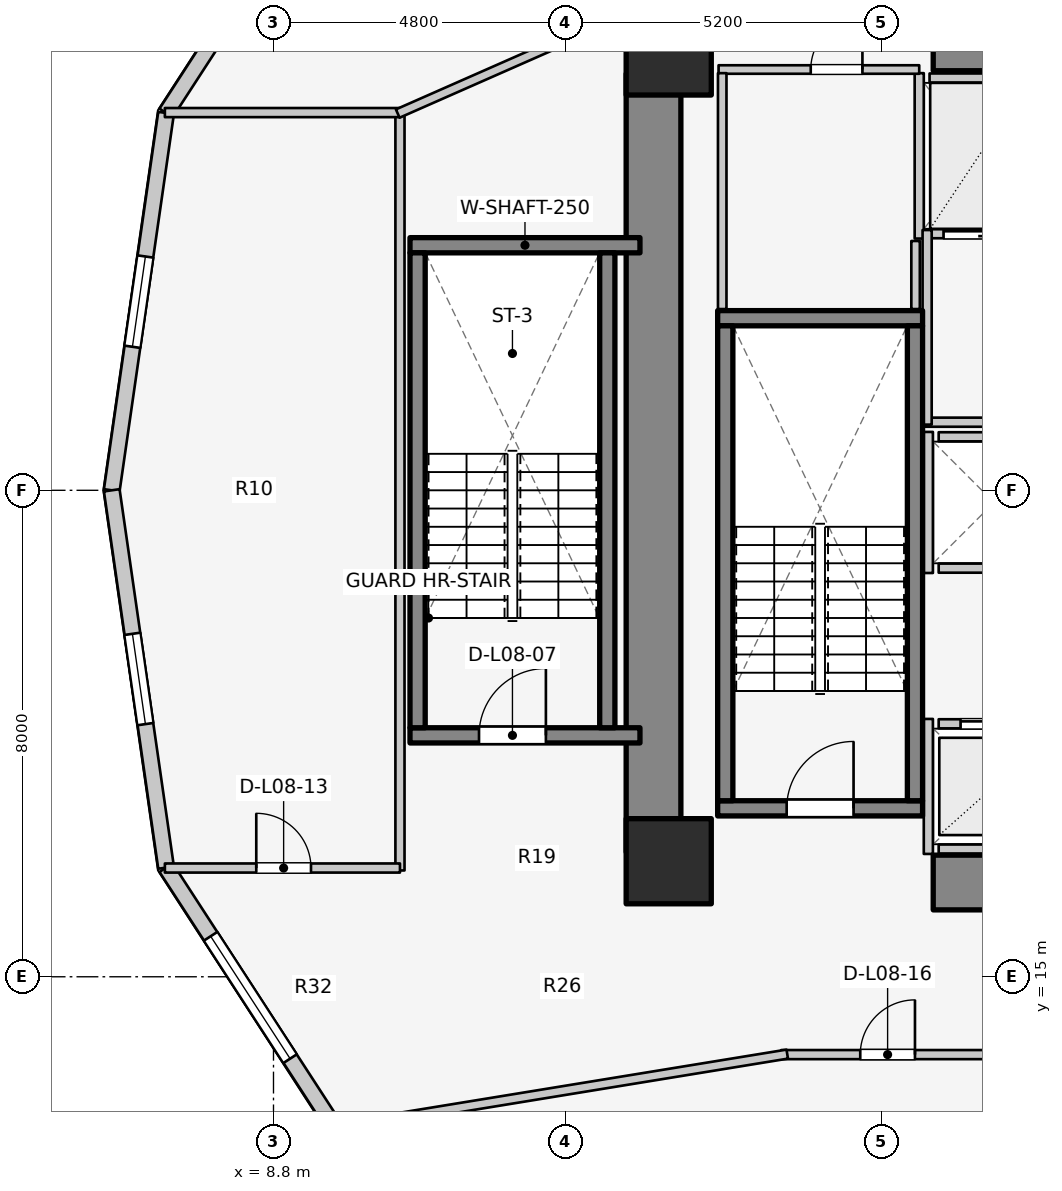
"""IFC4 building model, lengths in metres.
Left out: names, types, materials, properties, quantities, classifications, styles, units other than length and angle.
Written with IfcOpenShell. Run it as: python <this file> out.ifc"""

import sys

from ifc_helpers import new_model, si_unit, direction, frame, frame_2d, origin, origin_2d, place, context, subcontext, project, spatial, rectangle, extrude, element, fill, save


model = new_model("IFC4")
c1 = context("Model", 3, precision=1e-05, world=origin(), true_north=direction((0.0, 1.0)))
c2 = subcontext(c1, "Body", "Model", "MODEL_VIEW")
j1 = project(units=[si_unit("LENGTHUNIT", "METRE"), si_unit("PLANEANGLEUNIT", "RADIAN")], contexts=[c1])
p1 = place(None, origin())
s1 = spatial("IfcSite", under=j1, at=p1, CompositionType="ELEMENT")
p2 = place(p1, origin())
s2 = spatial("IfcBuilding", under=s1, at=p2, CompositionType="ELEMENT")
p3 = place(p2, frame((0.0, 0.0, 30.7)))
s3 = spatial("IfcBuildingStorey", under=s2, at=p3, CompositionType="ELEMENT", Elevation=30.7)
p4 = place(p3, frame((15.05, 17.05, 0.0), z_axis=(0.0, 0.0, 1.0), x_axis=(0.0, 1.0, 0.0)))
e1 = element("IfcWall", 1, at=p4, inside=s3, PredefinedType="SHEAR", context=c2, shape_type="SweptSolid", body=[
    extrude(rectangle(XDim=12.8, YDim=0.9, at=frame_2d((6.4, 0.0))), origin(), (0.0, 0.0, 1.0), 3.1),
])
for number, where, z_axis, x_axis in (
    (2, (19.65, 16.55, 0.0), (0.0, 0.0, 1.0), (1.0, 0.0, 0.0)),
    (3, (19.65, 30.35, 0.0), (0.0, 0.0, 1.0), (1.0, 0.0, 0.0)),
):
    element("IfcWall", number, at=place(p3, frame(where, z_axis=z_axis, x_axis=x_axis)), inside=s3, PredefinedType="SHEAR", context=c2, shape_type="SweptSolid", body=[
        extrude(rectangle(XDim=4.5, YDim=0.9, at=frame_2d((2.25, 0.0))), origin(), (0.0, 0.0, 1.0), 3.1),
    ])
p5 = place(p3, frame((16.105, 17.77, 0.0), z_axis=(0.0, 0.0, 1.0), x_axis=(1.0, 0.0, 0.0)))
e4 = element("IfcWall", 4, at=p5, inside=s3, PredefinedType="SOLIDWALL", context=c2, shape_type="SweptSolid", body=[
    extrude(rectangle(XDim=3.37, YDim=0.25, at=frame_2d((1.685, 0.0))), origin(), (0.0, 0.0, 1.0), 3.1),
])
p6 = place(p5, frame((1.135, 0.0, 0.0)))
e5 = element("IfcOpeningElement", 5, at=p6, cuts=e4, PredefinedType="OPENING", context=c2, shape_type="SweptSolid", body=[
    extrude(rectangle(XDim=1.1, YDim=2.1, at=frame_2d((0.55, 1.05))), frame((0.0, 0.135, 0.0), z_axis=(0.0, -1.0, 0.0), x_axis=(1.0, 0.0, 0.0)), (0.0, 0.0, 1.0), 0.27),
])
p7 = place(p3, frame((16.105, 25.83, 0.0), z_axis=(0.0, 0.0, 1.0), x_axis=(1.0, 0.0, 0.0)))
e6 = element("IfcWall", 6, at=p7, inside=s3, PredefinedType="SOLIDWALL", context=c2, shape_type="SweptSolid", body=[
    extrude(rectangle(XDim=3.37, YDim=0.25, at=frame_2d((1.685, 0.0))), origin(), (0.0, 0.0, 1.0), 3.1),
])
for number, where, z_axis, x_axis in (
    (7, (16.23, 17.895, 0.0), (0.0, 0.0, 1.0), (0.0, 1.0, 0.0)),
    (8, (19.35, 17.895, 0.0), (0.0, 0.0, 1.0), (0.0, 1.0, 0.0)),
):
    element("IfcWall", number, at=place(p3, frame(where, z_axis=z_axis, x_axis=x_axis)), inside=s3, PredefinedType="SOLIDWALL", context=c2, shape_type="SweptSolid", body=[
        extrude(rectangle(XDim=7.81, YDim=0.25, at=frame_2d((3.905, 0.0))), origin(), (0.0, 0.0, 1.0), 3.1),
    ])
p8 = place(p3, frame((11.045, 18.97, 0.0), z_axis=(0.0, 0.0, 1.0), x_axis=(1.0, 0.0, 0.0)))
e9 = element("IfcWall", 9, at=p8, inside=s3, PredefinedType="SOLIDWALL", context=c2, shape_type="SweptSolid", body=[
    extrude(rectangle(XDim=3.782, YDim=0.25, at=frame_2d((1.891, 0.0))), origin(), (0.0, 0.0, 1.0), 3.1),
])
p9 = place(p8, frame((1.135, 0.0, 0.0)))
e10 = element("IfcOpeningElement", 10, at=p9, cuts=e9, PredefinedType="OPENING", context=c2, shape_type="SweptSolid", body=[
    extrude(rectangle(XDim=1.1, YDim=2.1, at=frame_2d((0.55, 1.05))), frame((0.0, 0.135, 0.0), z_axis=(0.0, -1.0, 0.0), x_axis=(1.0, 0.0, 0.0)), (0.0, 0.0, 1.0), 0.27),
])
p10 = place(p3, frame((11.045, 27.03, 0.0), z_axis=(0.0, 0.0, 1.0), x_axis=(1.0, 0.0, 0.0)))
e11 = element("IfcWall", 11, at=p10, inside=s3, PredefinedType="SOLIDWALL", context=c2, shape_type="SweptSolid", body=[
    extrude(rectangle(XDim=3.782, YDim=0.25, at=frame_2d((1.891, 0.0))), origin(), (0.0, 0.0, 1.0), 3.1),
])
for number, where, z_axis, x_axis in (
    (12, (11.17, 19.095, 0.0), (0.0, 0.0, 1.0), (0.0, 1.0, 0.0)),
    (13, (14.29, 19.095, 0.0), (0.0, 0.0, 1.0), (0.0, 1.0, 0.0)),
):
    element("IfcWall", number, at=place(p3, frame(where, z_axis=z_axis, x_axis=x_axis)), inside=s3, PredefinedType="SOLIDWALL", context=c2, shape_type="SweptSolid", body=[
        extrude(rectangle(XDim=7.81, YDim=0.25, at=frame_2d((3.905, 0.0))), origin(), (0.0, 0.0, 1.0), 3.1),
    ])
for number, where, z_axis, x_axis in (
    (14, (15.3, 16.9, 0.0), (0.0, 0.0, 1.0), (1.0, 0.0, 0.0)),
    (15, (15.3, 30.2, 0.0), (0.0, 0.0, 1.0), (1.0, 0.0, 0.0)),
):
    element("IfcColumn", number, at=place(p3, frame(where, z_axis=z_axis, x_axis=x_axis)), inside=s3, PredefinedType="COLUMN", context=c2, shape_type="SweptSolid", body=[
        extrude(rectangle(XDim=1.4, YDim=1.4, at=origin_2d()), origin(), (0.0, 0.0, 1.0), 3.1),
    ])
p11 = place(p3, frame((9.806, 33.476, 0.0), z_axis=(0.0, 0.0, 1.0), x_axis=(-0.544578722263, -0.838709732421, 0.0)))
e16 = element("IfcWall", 16, at=p11, inside=s3, PredefinedType="STANDARD", context=c2, shape_type="SweptSolid", body=[
    extrude(rectangle(XDim=5.092, YDim=0.26, at=frame_2d((2.546, 0.0))), origin(), (0.0, 0.0, 1.0), 2.85),
])
p12 = place(p11, frame((1.346, 0.0, 0.75)))
e17 = element("IfcOpeningElement", 17, at=p12, cuts=e16, PredefinedType="OPENING", context=c2, shape_type="SweptSolid", body=[
    extrude(rectangle(XDim=2.4, YDim=1.7, at=frame_2d((1.2, 0.85))), frame((0.0, 0.14, 0.0), z_axis=(0.0, -1.0, 0.0), x_axis=(1.0, 0.0, 0.0)), (0.0, 0.0, 1.0), 0.28),
])
p13 = place(p3, frame((7.033, 29.205, 0.0), z_axis=(0.0, 0.0, 1.0), x_axis=(-0.142528001686, -0.989790770181, 0.0)))
e18 = element("IfcWall", 18, at=p13, inside=s3, PredefinedType="STANDARD", context=c2, shape_type="SweptSolid", body=[
    extrude(rectangle(XDim=6.269, YDim=0.26, at=frame_2d((3.135, 0.0))), origin(), (0.0, 0.0, 1.0), 2.85),
])
p14 = place(p13, frame((2.385, 0.0, 0.75)))
e19 = element("IfcOpeningElement", 19, at=p14, cuts=e18, PredefinedType="OPENING", context=c2, shape_type="SweptSolid", body=[
    extrude(rectangle(XDim=1.5, YDim=1.6, at=frame_2d((0.75, 0.8))), frame((0.0, 0.14, 0.0), z_axis=(0.0, -1.0, 0.0), x_axis=(1.0, 0.0, 0.0)), (0.0, 0.0, 1.0), 0.28),
])
p15 = place(p3, frame((6.14, 23.0, 0.0), z_axis=(0.0, 0.0, 1.0), x_axis=(0.142528001686, -0.989790770181, 0.0)))
e20 = element("IfcWall", 20, at=p15, inside=s3, PredefinedType="STANDARD", context=c2, shape_type="SweptSolid", body=[
    extrude(rectangle(XDim=6.269, YDim=0.26, at=frame_2d((3.135, 0.0))), origin(), (0.0, 0.0, 1.0), 2.85),
])
p16 = place(p15, frame((2.385, 0.0, 0.75)))
e21 = element("IfcOpeningElement", 21, at=p16, cuts=e20, PredefinedType="OPENING", context=c2, shape_type="SweptSolid", body=[
    extrude(rectangle(XDim=1.5, YDim=1.6, at=frame_2d((0.75, 0.8))), frame((0.0, 0.14, 0.0), z_axis=(0.0, -1.0, 0.0), x_axis=(1.0, 0.0, 0.0)), (0.0, 0.0, 1.0), 0.28),
])
p17 = place(p3, frame((7.033, 16.795, 0.0), z_axis=(0.0, 0.0, 1.0), x_axis=(0.544578722263, -0.838709732421, 0.0)))
e22 = element("IfcWall", 22, at=p17, inside=s3, PredefinedType="STANDARD", context=c2, shape_type="SweptSolid", body=[
    extrude(rectangle(XDim=5.092, YDim=0.26, at=frame_2d((2.546, 0.0))), origin(), (0.0, 0.0, 1.0), 2.85),
])
p18 = place(p17, frame((1.346, 0.0, 0.75)))
e23 = element("IfcOpeningElement", 23, at=p18, cuts=e22, PredefinedType="OPENING", context=c2, shape_type="SweptSolid", body=[
    extrude(rectangle(XDim=2.4, YDim=1.7, at=frame_2d((1.2, 0.85))), frame((0.0, 0.14, 0.0), z_axis=(0.0, -1.0, 0.0), x_axis=(1.0, 0.0, 0.0)), (0.0, 0.0, 1.0), 0.28),
])
p19 = place(p3, frame((19.74, 19.16, 0.0), z_axis=(0.0, 0.0, 1.0), x_axis=(1.0, 0.0, 0.0)))
e24 = element("IfcWall", 24, at=p19, inside=s3, PredefinedType="SOLIDWALL", context=c2, shape_type="SweptSolid", body=[
    extrude(rectangle(XDim=1.82, YDim=0.15, at=frame_2d((0.91, 0.0))), origin(), (0.0, 0.0, 1.0), 2.855),
])
p20 = place(p19, frame((0.36, 0.0, 0.0)))
e25 = element("IfcOpeningElement", 25, at=p20, cuts=e24, PredefinedType="OPENING", context=c2, shape_type="SweptSolid", body=[
    extrude(rectangle(XDim=1.1, YDim=2.1, at=frame_2d((0.55, 1.05))), frame((0.0, 0.085, 0.0), z_axis=(0.0, -1.0, 0.0), x_axis=(1.0, 0.0, 0.0)), (0.0, 0.0, 1.0), 0.17),
])
p21 = place(p3, frame((19.74, 17.1, 0.0), z_axis=(0.0, 0.0, 1.0), x_axis=(1.0, 0.0, 0.0)))
e26 = element("IfcWall", 26, at=p21, inside=s3, PredefinedType="SOLIDWALL", context=c2, shape_type="SweptSolid", body=[
    extrude(rectangle(XDim=1.82, YDim=0.15, at=frame_2d((0.91, 0.0))), origin(), (0.0, 0.0, 1.0), 2.855),
])
p22 = place(p3, frame((19.57, 17.02, 0.0), z_axis=(0.0, 0.0, 1.0), x_axis=(0.0, 1.0, 0.0)))
e27 = element("IfcWall", 27, at=p22, inside=s3, PredefinedType="SOLIDWALL", context=c2, shape_type="SweptSolid", body=[
    extrude(rectangle(XDim=2.22, YDim=0.15, at=frame_2d((1.11, 0.0))), origin(), (0.0, 0.0, 1.0), 2.12),
])
for number, where, z_axis, x_axis in (
    (28, (19.74, 21.72, 0.0), (0.0, 0.0, 1.0), (1.0, 0.0, 0.0)),
    (29, (19.74, 23.88, 0.0), (0.0, 0.0, 1.0), (1.0, 0.0, 0.0)),
):
    element("IfcWall", number, at=place(p3, frame(where, z_axis=z_axis, x_axis=x_axis)), inside=s3, PredefinedType="SOLIDWALL", context=c2, shape_type="SweptSolid", body=[
        extrude(rectangle(XDim=1.82, YDim=0.15, at=frame_2d((0.91, 0.0))), origin(), (0.0, 0.0, 1.0), 2.855),
    ])
p23 = place(p3, frame((19.57, 21.64, 0.0), z_axis=(0.0, 0.0, 1.0), x_axis=(0.0, 1.0, 0.0)))
e30 = element("IfcWall", 30, at=p23, inside=s3, PredefinedType="SOLIDWALL", context=c2, shape_type="SweptSolid", body=[
    extrude(rectangle(XDim=2.32, YDim=0.15, at=frame_2d((1.16, 0.0))), origin(), (0.0, 0.0, 1.0), 2.855),
])
p24 = place(p3, frame((19.59, 27.22, 0.0), z_axis=(0.0, 0.0, 1.0), x_axis=(1.0, 0.0, 0.0)))
e31 = element("IfcWall", 31, at=p24, inside=s3, PredefinedType="SOLIDWALL", context=c2, shape_type="SweptSolid", body=[
    extrude(rectangle(XDim=1.76, YDim=0.15, at=frame_2d((0.88, 0.0))), origin(), (0.0, 0.0, 1.0), 2.855),
])
p25 = place(p24, frame((0.23, 0.0, 0.0)))
e32 = element("IfcOpeningElement", 32, at=p25, cuts=e31, PredefinedType="OPENING", context=c2, shape_type="SweptSolid", body=[
    extrude(rectangle(XDim=1.3, YDim=2.1, at=frame_2d((0.65, 1.05))), frame((0.0, 0.085, 0.0), z_axis=(0.0, -1.0, 0.0), x_axis=(1.0, 0.0, 0.0)), (0.0, 0.0, 1.0), 0.17),
])
p26 = place(p3, frame((19.59, 29.78, 0.0), z_axis=(0.0, 0.0, 1.0), x_axis=(1.0, 0.0, 0.0)))
e33 = element("IfcWall", 33, at=p26, inside=s3, PredefinedType="SOLIDWALL", context=c2, shape_type="SweptSolid", body=[
    extrude(rectangle(XDim=1.76, YDim=0.15, at=frame_2d((0.88, 0.0))), origin(), (0.0, 0.0, 1.0), 2.855),
])
p27 = place(p3, frame((19.42, 27.14, 0.0), z_axis=(0.0, 0.0, 1.0), x_axis=(0.0, 1.0, 0.0)))
e34 = element("IfcWall", 34, at=p27, inside=s3, PredefinedType="SOLIDWALL", context=c2, shape_type="SweptSolid", body=[
    extrude(rectangle(XDim=2.72, YDim=0.15, at=frame_2d((1.36, 0.0))), origin(), (0.0, 0.0, 1.0), 2.855),
])
p28 = place(p3, frame((19.52, 24.12, 0.0), z_axis=(0.0, 0.0, 1.0), x_axis=(1.0, 0.0, 0.0)))
e35 = element("IfcWall", 35, at=p28, inside=s3, PredefinedType="PARTITIONING", context=c2, shape_type="SweptSolid", body=[
    extrude(rectangle(XDim=5.08, YDim=0.15, at=frame_2d((2.54, 0.0))), origin(), (0.0, 0.0, 1.0), 2.12),
])
p29 = place(p3, frame((19.55, 24.08, 0.0), z_axis=(0.0, 0.0, 1.0), x_axis=(0.0, 1.0, 0.0)))
e36 = element("IfcWall", 36, at=p29, inside=s3, PredefinedType="PARTITIONING", context=c2, shape_type="SweptSolid", body=[
    extrude(rectangle(XDim=3.2, YDim=0.15, at=frame_2d((1.6, 0.0))), origin(), (0.0, 0.0, 1.0), 2.855),
])
p30 = place(p3, frame((16.12, 29.92, 0.0), z_axis=(0.0, 0.0, 1.0), x_axis=(1.0, 0.0, 0.0)))
e37 = element("IfcWall", 37, at=p30, inside=s3, PredefinedType="PLUMBINGWALL", context=c2, shape_type="SweptSolid", body=[
    extrude(rectangle(XDim=3.3, YDim=0.14, at=frame_2d((1.65, 0.0))), origin(), (0.0, 0.0, 1.0), 2.855),
])
p31 = place(p30, frame((1.516, 0.0, 0.0)))
e38 = element("IfcOpeningElement", 38, at=p31, cuts=e37, PredefinedType="OPENING", context=c2, shape_type="SweptSolid", body=[
    extrude(rectangle(XDim=0.85, YDim=2.05, at=frame_2d((0.425, 1.025))), frame((0.0, 0.08, 0.0), z_axis=(0.0, -1.0, 0.0), x_axis=(1.0, 0.0, 0.0)), (0.0, 0.0, 1.0), 0.16),
])
p32 = place(p3, frame((16.18, 25.98, 0.0), z_axis=(0.0, 0.0, 1.0), x_axis=(0.0, 1.0, 0.0)))
e39 = element("IfcWall", 39, at=p32, inside=s3, PredefinedType="PLUMBINGWALL", context=c2, shape_type="SweptSolid", body=[
    extrude(rectangle(XDim=3.88, YDim=0.14, at=frame_2d((1.94, 0.0))), origin(), (0.0, 0.0, 1.0), 2.855),
])
p33 = place(p3, frame((19.36, 25.98, 0.0), z_axis=(0.0, 0.0, 1.0), x_axis=(0.0, 1.0, 0.0)))
e40 = element("IfcWall", 40, at=p33, inside=s3, PredefinedType="PLUMBINGWALL", context=c2, shape_type="SweptSolid", body=[
    extrude(rectangle(XDim=1.12, YDim=0.14, at=frame_2d((0.56, 0.0))), origin(), (0.0, 0.0, 1.0), 2.855),
])
p34 = place(p3, frame((10.88, 16.748, 0.0), z_axis=(0.0, 0.0, 1.0), x_axis=(0.0, 1.0, 0.0)))
e41 = element("IfcWall", 41, at=p34, inside=s3, PredefinedType="PARTITIONING", context=c2, shape_type="SweptSolid", body=[
    extrude(rectangle(XDim=12.503, YDim=0.15, at=frame_2d((6.252, 0.0))), origin(), (0.0, 0.0, 1.0), 2.12),
])
p35 = place(p3, frame((7.014, 16.788, 0.0), z_axis=(0.0, 0.0, 1.0), x_axis=(1.0, 0.0, 0.0)))
e42 = element("IfcWall", 42, at=p35, inside=s3, PredefinedType="PARTITIONING", context=c2, shape_type="SweptSolid", body=[
    extrude(rectangle(XDim=3.866, YDim=0.15, at=frame_2d((1.933, 0.0))), origin(), (0.0, 0.0, 1.0), 2.855),
])
p36 = place(p35, frame((1.503, 0.0, 0.0)))
e43 = element("IfcOpeningElement", 43, at=p36, cuts=e42, PredefinedType="OPENING", context=c2, shape_type="SweptSolid", body=[
    extrude(rectangle(XDim=0.9, YDim=2.1, at=frame_2d((0.45, 1.05))), frame((0.0, 0.085, 0.0), z_axis=(0.0, -1.0, 0.0), x_axis=(1.0, 0.0, 0.0)), (0.0, 0.0, 1.0), 0.17),
])
p37 = place(p3, frame((7.014, 29.212, 0.0), z_axis=(0.0, 0.0, 1.0), x_axis=(1.0, 0.0, 0.0)))
e44 = element("IfcWall", 44, at=p37, inside=s3, PredefinedType="PARTITIONING", context=c2, shape_type="SweptSolid", body=[
    extrude(rectangle(XDim=3.866, YDim=0.15, at=frame_2d((1.933, 0.0))), origin(), (0.0, 0.0, 1.0), 2.855),
])
p38 = place(p3, frame((10.844, 29.196, 0.0), z_axis=(0.0, 0.0, 1.0), x_axis=(0.91502756289, 0.403391322604, 0.0)))
e45 = element("IfcWall", 45, at=p38, inside=s3, PredefinedType="PARTITIONING", context=c2, shape_type="SweptSolid", body=[
    extrude(rectangle(XDim=4.637, YDim=0.15, at=frame_2d((2.319, 0.0))), origin(), (0.0, 0.0, 1.0), 2.069),
])
p39 = place(p3, frame((17.15, 13.72, 0.0), z_axis=(0.0, 0.0, 1.0), x_axis=(1.0, 0.0, 0.0)))
e46 = element("IfcWall", 46, at=p39, inside=s3, PredefinedType="PARTITIONING", context=c2, shape_type="SweptSolid", body=[
    extrude(rectangle(XDim=7.52, YDim=0.15, at=frame_2d((3.76, 0.0))), origin(), (0.0, 0.0, 1.0), 2.237),
])
p40 = place(p39, frame((1.3, 0.0, 0.0)))
e47 = element("IfcOpeningElement", 47, at=p40, cuts=e46, PredefinedType="OPENING", context=c2, shape_type="SweptSolid", body=[
    extrude(rectangle(XDim=0.9, YDim=2.1, at=frame_2d((0.45, 1.05))), frame((0.0, 0.085, 0.0), z_axis=(0.0, -1.0, 0.0), x_axis=(1.0, 0.0, 0.0)), (0.0, 0.0, 1.0), 0.17),
])
p41 = place(p3, frame((17.249, 13.728, 0.0), z_axis=(0.0, 0.0, 1.0), x_axis=(-0.98693078372, -0.161144742846, 0.0)))
e48 = element("IfcWall", 48, at=p41, inside=s3, PredefinedType="PARTITIONING", context=c2, shape_type="SweptSolid", body=[
    extrude(rectangle(XDim=7.557, YDim=0.15, at=frame_2d((3.779, 0.0))), origin(), (0.0, 0.0, 1.0), 2.069),
])
p42 = place(p3, frame((27.032, 13.569, 0.0), z_axis=(0.0, 0.0, 1.0), x_axis=(-0.781055486744, -0.624461629428, 0.0)))
e49 = element("IfcWall", 49, at=p42, inside=s3, PredefinedType="PARTITIONING", context=c2, shape_type="SweptSolid", body=[
    extrude(rectangle(XDim=10.843, YDim=0.18, at=frame_2d((5.422, 0.0))), origin(), (0.0, 0.0, 1.0), 2.237),
])
p43 = place(p14, origin())
e50 = element("IfcWindow", 50, at=p43, inside=s3, PartitioningType="SINGLE_PANEL", PredefinedType="WINDOW", context=c2, shape_type="SweptSolid", body=[
    extrude(rectangle(XDim=1.5, YDim=1.6, at=frame_2d((0.75, 0.8))), frame((0.0, 0.03, 0.0), z_axis=(0.0, -1.0, 0.0), x_axis=(1.0, 0.0, 0.0)), (0.0, 0.0, 1.0), 0.06),
])
fill(e19, e50)
p44 = place(p16, origin())
e51 = element("IfcWindow", 51, at=p44, inside=s3, PartitioningType="SINGLE_PANEL", PredefinedType="WINDOW", context=c2, shape_type="SweptSolid", body=[
    extrude(rectangle(XDim=1.5, YDim=1.6, at=frame_2d((0.75, 0.8))), frame((0.0, 0.03, 0.0), z_axis=(0.0, -1.0, 0.0), x_axis=(1.0, 0.0, 0.0)), (0.0, 0.0, 1.0), 0.06),
])
fill(e21, e51)
p45 = place(p18, origin())
e52 = element("IfcWindow", 52, at=p45, inside=s3, PartitioningType="SINGLE_PANEL", PredefinedType="WINDOW", context=c2, shape_type="SweptSolid", body=[
    extrude(rectangle(XDim=2.4, YDim=1.7, at=frame_2d((1.2, 0.85))), frame((0.0, 0.03, 0.0), z_axis=(0.0, -1.0, 0.0), x_axis=(1.0, 0.0, 0.0)), (0.0, 0.0, 1.0), 0.06),
])
fill(e23, e52)
p46 = place(p6, origin())
e53 = element("IfcDoor", 53, at=p46, inside=s3, OperationType="SINGLE_SWING_RIGHT", PredefinedType="DOOR", context=c2, shape_type="SweptSolid", body=[
    extrude(rectangle(XDim=1.1, YDim=2.1, at=frame_2d((0.55, 1.05))), frame((0.0, 0.025, 0.0), z_axis=(0.0, -1.0, 0.0), x_axis=(1.0, 0.0, 0.0)), (0.0, 0.0, 1.0), 0.05),
])
fill(e5, e53)
p47 = place(p9, origin())
e54 = element("IfcDoor", 54, at=p47, inside=s3, OperationType="SINGLE_SWING_RIGHT", PredefinedType="DOOR", context=c2, shape_type="SweptSolid", body=[
    extrude(rectangle(XDim=1.1, YDim=2.1, at=frame_2d((0.55, 1.05))), frame((0.0, 0.025, 0.0), z_axis=(0.0, -1.0, 0.0), x_axis=(1.0, 0.0, 0.0)), (0.0, 0.0, 1.0), 0.05),
])
fill(e10, e54)
p48 = place(p20, origin())
e55 = element("IfcDoor", 55, at=p48, inside=s3, OperationType="DOUBLE_DOOR_SLIDING", PredefinedType="DOOR", context=c2, shape_type="SweptSolid", body=[
    extrude(rectangle(XDim=1.1, YDim=2.1, at=frame_2d((0.55, 1.05))), frame((0.0, 0.025, 0.0), z_axis=(0.0, -1.0, 0.0), x_axis=(1.0, 0.0, 0.0)), (0.0, 0.0, 1.0), 0.05),
])
fill(e25, e55)
p49 = place(p25, origin())
e56 = element("IfcDoor", 56, at=p49, inside=s3, OperationType="DOUBLE_DOOR_SLIDING", PredefinedType="DOOR", context=c2, shape_type="SweptSolid", body=[
    extrude(rectangle(XDim=1.3, YDim=2.1, at=frame_2d((0.65, 1.05))), frame((0.0, 0.025, 0.0), z_axis=(0.0, -1.0, 0.0), x_axis=(1.0, 0.0, 0.0)), (0.0, 0.0, 1.0), 0.05),
])
fill(e32, e56)
p50 = place(p31, origin())
e57 = element("IfcDoor", 57, at=p50, inside=s3, OperationType="SINGLE_SWING_RIGHT", PredefinedType="DOOR", context=c2, shape_type="SweptSolid", body=[
    extrude(rectangle(XDim=0.85, YDim=2.05, at=frame_2d((0.425, 1.025))), frame((0.0, 0.025, 0.0), z_axis=(0.0, -1.0, 0.0), x_axis=(1.0, 0.0, 0.0)), (0.0, 0.0, 1.0), 0.05),
])
fill(e38, e57)
p51 = place(p36, origin())
e58 = element("IfcDoor", 58, at=p51, inside=s3, OperationType="SINGLE_SWING_LEFT", PredefinedType="DOOR", context=c2, shape_type="SweptSolid", body=[
    extrude(rectangle(XDim=0.9, YDim=2.1, at=frame_2d((0.45, 1.05))), frame((0.0, 0.025, 0.0), z_axis=(0.0, -1.0, 0.0), x_axis=(1.0, 0.0, 0.0)), (0.0, 0.0, 1.0), 0.05),
])
fill(e43, e58)
p52 = place(p40, origin())
e59 = element("IfcDoor", 59, at=p52, inside=s3, OperationType="SINGLE_SWING_RIGHT", PredefinedType="DOOR", context=c2, shape_type="SweptSolid", body=[
    extrude(rectangle(XDim=0.9, YDim=2.1, at=frame_2d((0.45, 1.05))), frame((0.0, 0.025, 0.0), z_axis=(0.0, -1.0, 0.0), x_axis=(1.0, 0.0, 0.0)), (0.0, 0.0, 1.0), 0.05),
])
fill(e47, e59)
save(model, sys.argv[1])
